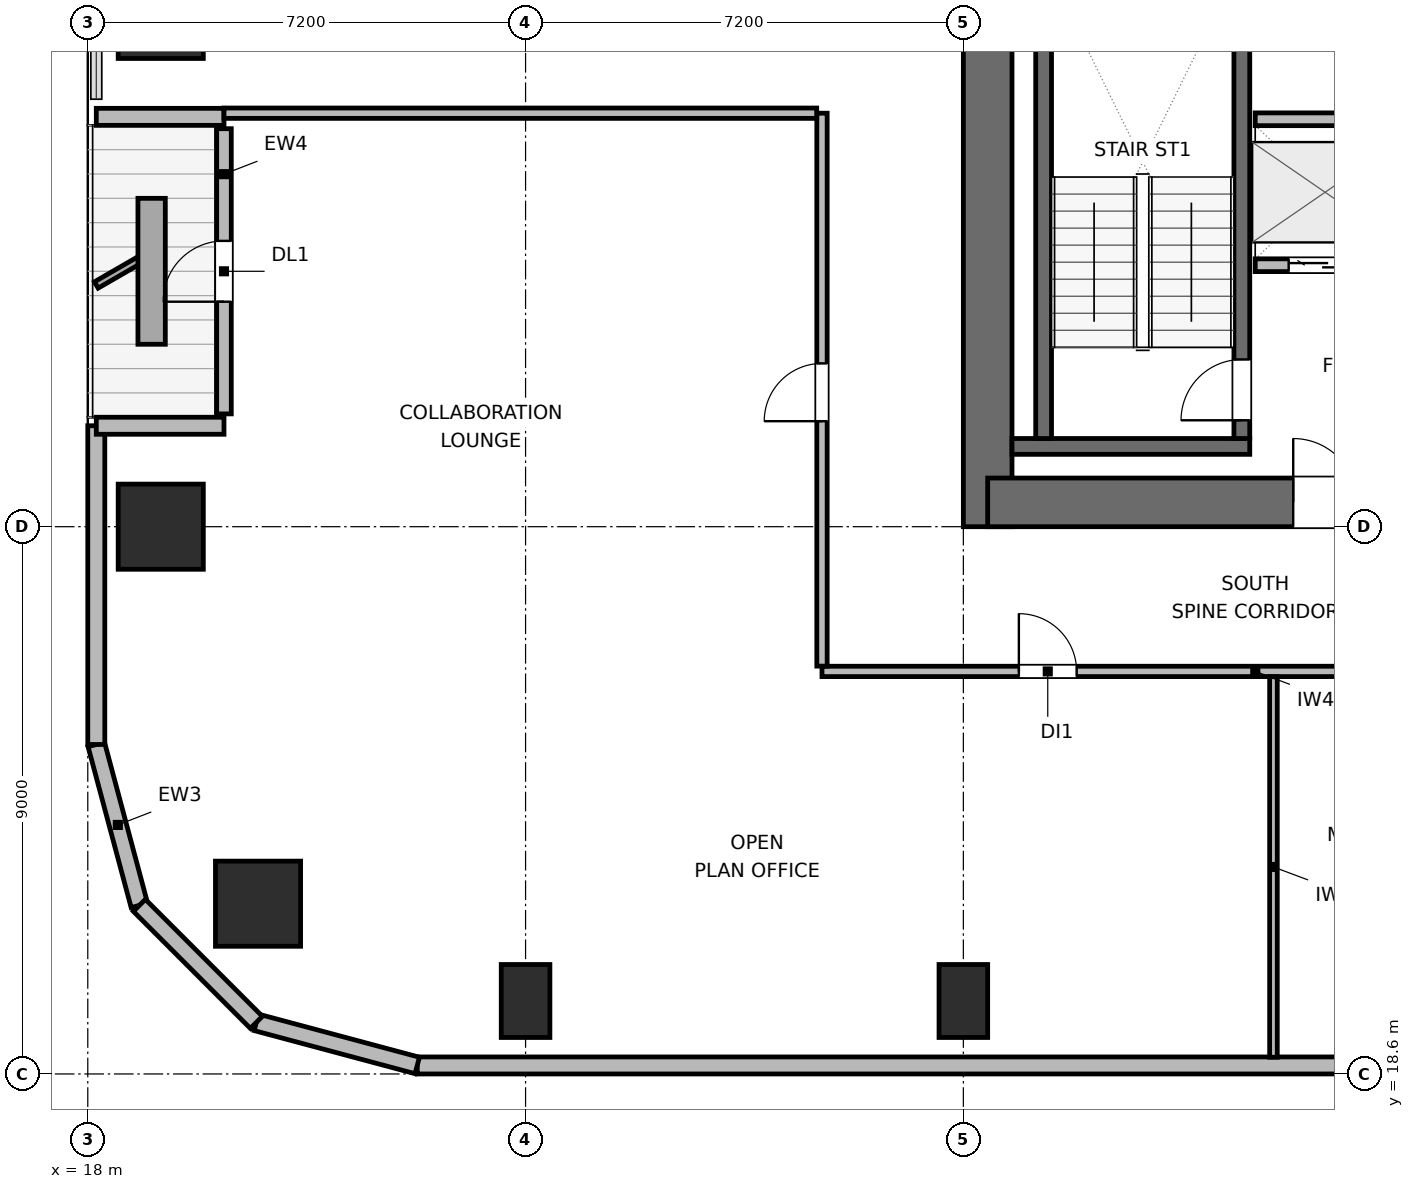
"""IFC4 building model, lengths in metres.
Left out: names, types, materials, properties, quantities, classifications, styles, units other than length and angle.
Written with IfcOpenShell. Run it as: python <this file> out.ifc"""

import sys

from ifc_helpers import new_model, si_unit, direction, frame, frame_2d, origin, origin_2d, place, context, subcontext, project, spatial, rectangle, circle, extrude, element, fill, save


model = new_model("IFC4")
c1 = context("Model", 3, precision=1e-05, world=origin(), true_north=direction((0.0, 1.0)))
c2 = subcontext(c1, "Body", "Model", "MODEL_VIEW")
j1 = project(units=[si_unit("LENGTHUNIT", "METRE"), si_unit("PLANEANGLEUNIT", "RADIAN")], contexts=[c1])
p1 = place(None, origin())
s1 = spatial("IfcSite", under=j1, at=p1, CompositionType="ELEMENT")
p2 = place(p1, origin())
s2 = spatial("IfcBuilding", under=s1, at=p2, CompositionType="ELEMENT")
p3 = place(p2, frame((0.0, 0.0, 150.6)))
s3 = spatial("IfcBuildingStorey", under=s2, at=p3, CompositionType="ELEMENT", Elevation=150.6)
p4 = place(p3, frame((32.8, 27.6, 0.0), z_axis=(0.0, 0.0, 1.0), x_axis=(0.0, 1.0, 0.0)))
e1 = element("IfcWall", 1, at=p4, inside=s3, PredefinedType="SHEAR", context=c2, shape_type="SweptSolid", body=[
    extrude(rectangle(XDim=16.8, YDim=0.8, at=frame_2d((8.4, 0.0))), origin(), (0.0, 0.0, 1.0), 3.9),
])
p5 = place(p3, frame((32.8, 28.0, 0.0), z_axis=(0.0, 0.0, 1.0), x_axis=(1.0, 0.0, 0.0)))
e2 = element("IfcWall", 2, at=p5, inside=s3, PredefinedType="SHEAR", context=c2, shape_type="SweptSolid", body=[
    extrude(rectangle(XDim=9.2, YDim=0.8, at=frame_2d((4.6, 0.0))), origin(), (0.0, 0.0, 1.0), 3.9),
])
p6 = place(p5, frame((5.025, 0.0, 0.0)))
e3 = element("IfcOpeningElement", 3, at=p6, cuts=e2, PredefinedType="OPENING", context=c2, shape_type="SweptSolid", body=[
    extrude(rectangle(XDim=1.05, YDim=2.04, at=frame_2d((0.525, 1.02))), frame((0.0, 0.41, 0.0), z_axis=(0.0, -1.0, 0.0), x_axis=(1.0, 0.0, 0.0)), (0.0, 0.0, 1.0), 0.82),
])
p7 = place(p3, frame((33.2, 28.92, 0.0), z_axis=(0.0, 0.0, 1.0), x_axis=(1.0, 0.0, 0.0)))
e4 = element("IfcWall", 4, at=p7, inside=s3, PredefinedType="SHEAR", context=c2, shape_type="SweptSolid", body=[
    extrude(rectangle(XDim=3.91, YDim=0.26, at=frame_2d((1.955, 0.0))), origin(), (0.0, 0.0, 1.0), 3.9),
])
p8 = place(p3, frame((33.72, 29.05, 0.0), z_axis=(0.0, 0.0, 1.0), x_axis=(0.0, 1.0, 0.0)))
e5 = element("IfcWall", 5, at=p8, inside=s3, PredefinedType="SHEAR", context=c2, shape_type="SweptSolid", body=[
    extrude(rectangle(XDim=7.6, YDim=0.26, at=frame_2d((3.8, 0.0))), origin(), (0.0, 0.0, 1.0), 3.9),
])
p9 = place(p3, frame((36.98, 29.05, 0.0), z_axis=(0.0, 0.0, 1.0), x_axis=(0.0, 1.0, 0.0)))
e6 = element("IfcWall", 6, at=p9, inside=s3, PredefinedType="SHEAR", context=c2, shape_type="SweptSolid", body=[
    extrude(rectangle(XDim=7.6, YDim=0.26, at=frame_2d((3.8, 0.0))), origin(), (0.0, 0.0, 1.0), 3.9),
])
p10 = place(p9, frame((0.3, 0.0, 0.0)))
e7 = element("IfcOpeningElement", 7, at=p10, cuts=e6, PredefinedType="OPENING", context=c2, shape_type="SweptSolid", body=[
    extrude(rectangle(XDim=1.0, YDim=2.04, at=frame_2d((0.5, 1.02))), frame((0.0, 0.14, 0.0), z_axis=(0.0, -1.0, 0.0), x_axis=(1.0, 0.0, 0.0)), (0.0, 0.0, 1.0), 0.28),
])
p11 = place(p3, frame((20.8, 21.4, 0.0), z_axis=(0.0, 0.0, 1.0), x_axis=(1.0, 0.0, 0.0)))
e8 = element("IfcColumn", 8, at=p11, inside=s3, PredefinedType="COLUMN", context=c2, shape_type="SweptSolid", body=[
    extrude(circle(Radius=0.7, at=origin_2d()), origin(), (0.0, 0.0, 1.0), 3.9),
])
for number, where, z_axis, x_axis in (
    (9, (25.2, 19.8, 0.0), (0.0, 0.0, 1.0), (1.0, 0.0, 0.0)),
    (10, (32.4, 19.8, 0.0), (0.0, 0.0, 1.0), (1.0, 0.0, 0.0)),
):
    element("IfcColumn", number, at=place(p3, frame(where, z_axis=z_axis, x_axis=x_axis)), inside=s3, PredefinedType="COLUMN", context=c2, shape_type="SweptSolid", body=[
        extrude(rectangle(XDim=0.8, YDim=1.2, at=origin_2d()), origin(), (0.0, 0.0, 1.0), 3.9),
    ])
for number, where, z_axis, x_axis in (
    (11, (19.2, 27.6, 0.0), (0.0, 0.0, 1.0), (1.0, 0.0, 0.0)),
    (12, (19.2, 36.0, 0.0), (0.0, 0.0, 1.0), (1.0, 0.0, 0.0)),
):
    element("IfcColumn", number, at=place(p3, frame(where, z_axis=z_axis, x_axis=x_axis)), inside=s3, PredefinedType="COLUMN", context=c2, shape_type="SweptSolid", body=[
        extrude(rectangle(XDim=1.4, YDim=1.4, at=origin_2d()), origin(), (0.0, 0.0, 1.0), 3.9),
    ])
p12 = place(p3, frame((18.848, 21.373, 0.0), z_axis=(0.0, 0.0, 1.0), x_axis=(-0.258672222976, 0.9659651552, 0.0)))
e13 = element("IfcWall", 13, at=p12, inside=s3, PredefinedType="SOLIDWALL", context=c2, shape_type="SweptSolid", body=[
    extrude(rectangle(XDim=2.739, YDim=0.28, at=frame_2d((1.37, 0.0))), origin(), (0.0, 0.0, 1.0), 3.68),
])
p13 = place(p3, frame((18.14, 24.018, 0.0), z_axis=(0.0, 0.0, 1.0), x_axis=(0.0, 1.0, 0.0)))
e14 = element("IfcWall", 14, at=p13, inside=s3, PredefinedType="SOLIDWALL", context=c2, shape_type="SweptSolid", body=[
    extrude(rectangle(XDim=5.242, YDim=0.28, at=frame_2d((2.621, 0.0))), origin(), (0.0, 0.0, 1.0), 3.68),
])
p14 = place(p3, frame((18.14, 29.26, 0.0), z_axis=(0.0, 0.0, 1.0), x_axis=(1.0, 0.0, 0.0)))
e15 = element("IfcWall", 15, at=p14, inside=s3, PredefinedType="SOLIDWALL", context=c2, shape_type="SweptSolid", body=[
    extrude(rectangle(XDim=2.1, YDim=0.28, at=frame_2d((1.05, 0.0))), origin(), (0.0, 0.0, 1.0), 3.116),
])
p15 = place(p3, frame((20.24, 29.455, 0.0), z_axis=(0.0, 0.0, 1.0), x_axis=(0.0, 1.0, 0.0)))
e16 = element("IfcWall", 16, at=p15, inside=s3, PredefinedType="SOLIDWALL", context=c2, shape_type="SweptSolid", body=[
    extrude(rectangle(XDim=4.69, YDim=0.24, at=frame_2d((2.345, 0.0))), origin(), (0.0, 0.0, 1.0), 3.248),
])
p16 = place(p15, frame((1.845, 0.0, 0.0)))
e17 = element("IfcOpeningElement", 17, at=p16, cuts=e16, PredefinedType="OPENING", context=c2, shape_type="SweptSolid", body=[
    extrude(rectangle(XDim=1.0, YDim=2.02, at=frame_2d((0.5, 1.01))), frame((0.0, 0.13, 0.0), z_axis=(0.0, -1.0, 0.0), x_axis=(1.0, 0.0, 0.0)), (0.0, 0.0, 1.0), 0.26),
])
p17 = place(p3, frame((20.24, 34.34, 0.0), z_axis=(0.0, 0.0, 1.0), x_axis=(-1.0, 0.0, 0.0)))
e18 = element("IfcWall", 18, at=p17, inside=s3, PredefinedType="SOLIDWALL", context=c2, shape_type="SweptSolid", body=[
    extrude(rectangle(XDim=2.1, YDim=0.28, at=frame_2d((1.05, 0.0))), origin(), (0.0, 0.0, 1.0), 3.116),
])
p18 = place(p3, frame((41.36, 18.74, 0.0), z_axis=(0.0, 0.0, 1.0), x_axis=(-1.0, 0.0, 0.0)))
e19 = element("IfcWall", 19, at=p18, inside=s3, PredefinedType="SOLIDWALL", context=c2, shape_type="SweptSolid", body=[
    extrude(rectangle(XDim=17.942, YDim=0.28, at=frame_2d((8.971, 0.0))), origin(), (0.0, 0.0, 1.0), 3.68),
])
p19 = place(p3, frame((23.418, 18.74, 0.0), z_axis=(0.0, 0.0, 1.0), x_axis=(-0.965971118627, 0.258649952598, 0.0)))
e20 = element("IfcWall", 20, at=p19, inside=s3, PredefinedType="SOLIDWALL", context=c2, shape_type="SweptSolid", body=[
    extrude(rectangle(XDim=2.739, YDim=0.28, at=frame_2d((1.37, 0.0))), origin(), (0.0, 0.0, 1.0), 3.68),
])
p20 = place(p3, frame((20.772, 19.448, 0.0), z_axis=(0.0, 0.0, 1.0), x_axis=(-0.707106781187, 0.707106781187, 0.0)))
e21 = element("IfcWall", 21, at=p20, inside=s3, PredefinedType="SOLIDWALL", context=c2, shape_type="SweptSolid", body=[
    extrude(rectangle(XDim=2.721, YDim=0.28, at=frame_2d((1.36, 0.0))), origin(), (0.0, 0.0, 1.0), 3.68),
])
p21 = place(p3, frame((37.2, 31.9, 0.0), z_axis=(0.0, 0.0, 1.0), x_axis=(1.0, 0.0, 0.0)))
e22 = element("IfcWall", 22, at=p21, inside=s3, PredefinedType="PARTITIONING", context=c2, shape_type="SweptSolid", body=[
    extrude(rectangle(XDim=2.3, YDim=0.21, at=frame_2d((1.15, 0.0))), origin(), (0.0, 0.0, 1.0), 3.68),
])
p22 = place(p21, frame((0.55, 0.0, 0.0)))
e23 = element("IfcOpeningElement", 23, at=p22, cuts=e22, PredefinedType="OPENING", context=c2, shape_type="SweptSolid", body=[
    extrude(rectangle(XDim=1.2, YDim=2.04, at=frame_2d((0.6, 1.02))), frame((0.0, 0.115, 0.0), z_axis=(0.0, -1.0, 0.0), x_axis=(1.0, 0.0, 0.0)), (0.0, 0.0, 1.0), 0.23),
])
p23 = place(p3, frame((37.2, 34.3, 0.0), z_axis=(0.0, 0.0, 1.0), x_axis=(1.0, 0.0, 0.0)))
e24 = element("IfcWall", 24, at=p23, inside=s3, PredefinedType="PARTITIONING", context=c2, shape_type="SweptSolid", body=[
    extrude(rectangle(XDim=2.3, YDim=0.21, at=frame_2d((1.15, 0.0))), origin(), (0.0, 0.0, 1.0), 3.68),
])
p24 = place(p3, frame((30.075, 25.22, 0.0), z_axis=(0.0, 0.0, 1.0), x_axis=(1.0, 0.0, 0.0)))
e25 = element("IfcWall", 25, at=p24, inside=s3, PredefinedType="PARTITIONING", context=c2, shape_type="SweptSolid", body=[
    extrude(rectangle(XDim=33.525, YDim=0.17, at=frame_2d((16.763, 0.0))), origin(), (0.0, 0.0, 1.0), 3.68),
])
p25 = place(p24, frame((3.238, 0.0, 0.0)))
e26 = element("IfcOpeningElement", 26, at=p25, cuts=e25, PredefinedType="OPENING", context=c2, shape_type="SweptSolid", body=[
    extrude(rectangle(XDim=0.95, YDim=2.04, at=frame_2d((0.475, 1.02))), frame((0.0, 0.095, 0.0), z_axis=(0.0, -1.0, 0.0), x_axis=(1.0, 0.0, 0.0)), (0.0, 0.0, 1.0), 0.19),
])
p26 = place(p24, frame((10.065, 0.0, 0.0)))
e27 = element("IfcOpeningElement", 27, at=p26, cuts=e25, PredefinedType="OPENING", context=c2, shape_type="SweptSolid", body=[
    extrude(rectangle(XDim=0.95, YDim=2.04, at=frame_2d((0.475, 1.02))), frame((0.0, 0.095, 0.0), z_axis=(0.0, -1.0, 0.0), x_axis=(1.0, 0.0, 0.0)), (0.0, 0.0, 1.0), 0.19),
])
p27 = place(p24, frame((16.29, 0.0, 0.0)))
e28 = element("IfcOpeningElement", 28, at=p27, cuts=e25, PredefinedType="OPENING", context=c2, shape_type="SweptSolid", body=[
    extrude(rectangle(XDim=0.95, YDim=2.04, at=frame_2d((0.475, 1.02))), frame((0.0, 0.095, 0.0), z_axis=(0.0, -1.0, 0.0), x_axis=(1.0, 0.0, 0.0)), (0.0, 0.0, 1.0), 0.19),
])
p28 = place(p24, frame((22.51, 0.0, 0.0)))
e29 = element("IfcOpeningElement", 29, at=p28, cuts=e25, PredefinedType="OPENING", context=c2, shape_type="SweptSolid", body=[
    extrude(rectangle(XDim=0.95, YDim=2.04, at=frame_2d((0.475, 1.02))), frame((0.0, 0.095, 0.0), z_axis=(0.0, -1.0, 0.0), x_axis=(1.0, 0.0, 0.0)), (0.0, 0.0, 1.0), 0.19),
])
p29 = place(p24, frame((29.335, 0.0, 0.0)))
e30 = element("IfcOpeningElement", 30, at=p29, cuts=e25, PredefinedType="OPENING", context=c2, shape_type="SweptSolid", body=[
    extrude(rectangle(XDim=0.95, YDim=2.04, at=frame_2d((0.475, 1.02))), frame((0.0, 0.095, 0.0), z_axis=(0.0, -1.0, 0.0), x_axis=(1.0, 0.0, 0.0)), (0.0, 0.0, 1.0), 0.19),
])
p30 = place(p3, frame((30.075, 25.307, 0.0), z_axis=(0.0, 0.0, 1.0), x_axis=(0.0, 1.0, 0.0)))
e31 = element("IfcWall", 31, at=p30, inside=s3, PredefinedType="PARTITIONING", context=c2, shape_type="SweptSolid", body=[
    extrude(rectangle(XDim=9.093, YDim=0.17, at=frame_2d((4.546, 0.0))), origin(), (0.0, 0.0, 1.0), 3.68),
])
p31 = place(p30, frame((4.028, 0.0, 0.0)))
e32 = element("IfcOpeningElement", 32, at=p31, cuts=e31, PredefinedType="OPENING", context=c2, shape_type="SweptSolid", body=[
    extrude(rectangle(XDim=0.95, YDim=2.04, at=frame_2d((0.475, 1.02))), frame((0.0, 0.095, 0.0), z_axis=(0.0, -1.0, 0.0), x_axis=(1.0, 0.0, 0.0)), (0.0, 0.0, 1.0), 0.19),
])
p32 = place(p3, frame((37.5, 18.875, 0.0), z_axis=(0.0, 0.0, 1.0), x_axis=(0.0, 1.0, 0.0)))
e33 = element("IfcWall", 33, at=p32, inside=s3, PredefinedType="PARTITIONING", context=c2, shape_type="SweptSolid", body=[
    extrude(rectangle(XDim=6.258, YDim=0.125, at=frame_2d((3.129, 0.0))), origin(), (0.0, 0.0, 1.0), 3.68),
])
p33 = place(p3, frame((20.24, 34.4, 0.0), z_axis=(0.0, 0.0, 1.0), x_axis=(1.0, 0.0, 0.0)))
e34 = element("IfcWall", 34, at=p33, inside=s3, PredefinedType="PARTITIONING", context=c2, shape_type="SweptSolid", body=[
    extrude(rectangle(XDim=9.748, YDim=0.17, at=frame_2d((4.874, 0.0))), origin(), (0.0, 0.0, 1.0), 3.68),
])
p34 = place(p16, origin())
e35 = element("IfcDoor", 35, at=p34, inside=s3, OperationType="SINGLE_SWING_LEFT", PredefinedType="DOOR", context=c2, shape_type="SweptSolid", body=[
    extrude(rectangle(XDim=1.0, YDim=2.02, at=frame_2d((0.5, 1.01))), frame((0.0, 0.025, 0.0), z_axis=(0.0, -1.0, 0.0), x_axis=(1.0, 0.0, 0.0)), (0.0, 0.0, 1.0), 0.05),
])
fill(e17, e35)
p35 = place(p10, origin())
e36 = element("IfcDoor", 36, at=p35, inside=s3, OperationType="SINGLE_SWING_LEFT", PredefinedType="DOOR", context=c2, shape_type="SweptSolid", body=[
    extrude(rectangle(XDim=1.0, YDim=2.04, at=frame_2d((0.5, 1.02))), frame((0.0, 0.025, 0.0), z_axis=(0.0, -1.0, 0.0), x_axis=(1.0, 0.0, 0.0)), (0.0, 0.0, 1.0), 0.05),
])
fill(e7, e36)
p36 = place(p22, origin())
e37 = element("IfcDoor", 37, at=p36, inside=s3, OperationType="DOUBLE_DOOR_SLIDING", PredefinedType="DOOR", context=c2, shape_type="SweptSolid", body=[
    extrude(rectangle(XDim=1.2, YDim=2.04, at=frame_2d((0.6, 1.02))), frame((0.0, 0.025, 0.0), z_axis=(0.0, -1.0, 0.0), x_axis=(1.0, 0.0, 0.0)), (0.0, 0.0, 1.0), 0.05),
])
fill(e23, e37)
p37 = place(p6, origin())
e38 = element("IfcDoor", 38, at=p37, inside=s3, OperationType="SINGLE_SWING_LEFT", PredefinedType="DOOR", context=c2, shape_type="SweptSolid", body=[
    extrude(rectangle(XDim=1.05, YDim=2.04, at=frame_2d((0.525, 1.02))), frame((0.0, 0.025, 0.0), z_axis=(0.0, -1.0, 0.0), x_axis=(1.0, 0.0, 0.0)), (0.0, 0.0, 1.0), 0.05),
])
fill(e3, e38)
p38 = place(p25, origin())
e39 = element("IfcDoor", 39, at=p38, inside=s3, OperationType="SINGLE_SWING_LEFT", PredefinedType="DOOR", context=c2, shape_type="SweptSolid", body=[
    extrude(rectangle(XDim=0.95, YDim=2.04, at=frame_2d((0.475, 1.02))), frame((0.0, 0.025, 0.0), z_axis=(0.0, -1.0, 0.0), x_axis=(1.0, 0.0, 0.0)), (0.0, 0.0, 1.0), 0.05),
])
fill(e26, e39)
p39 = place(p31, origin())
e40 = element("IfcDoor", 40, at=p39, inside=s3, OperationType="SINGLE_SWING_LEFT", PredefinedType="DOOR", context=c2, shape_type="SweptSolid", body=[
    extrude(rectangle(XDim=0.95, YDim=2.04, at=frame_2d((0.475, 1.02))), frame((0.0, 0.025, 0.0), z_axis=(0.0, -1.0, 0.0), x_axis=(1.0, 0.0, 0.0)), (0.0, 0.0, 1.0), 0.05),
])
fill(e32, e40)
save(model, sys.argv[1])
